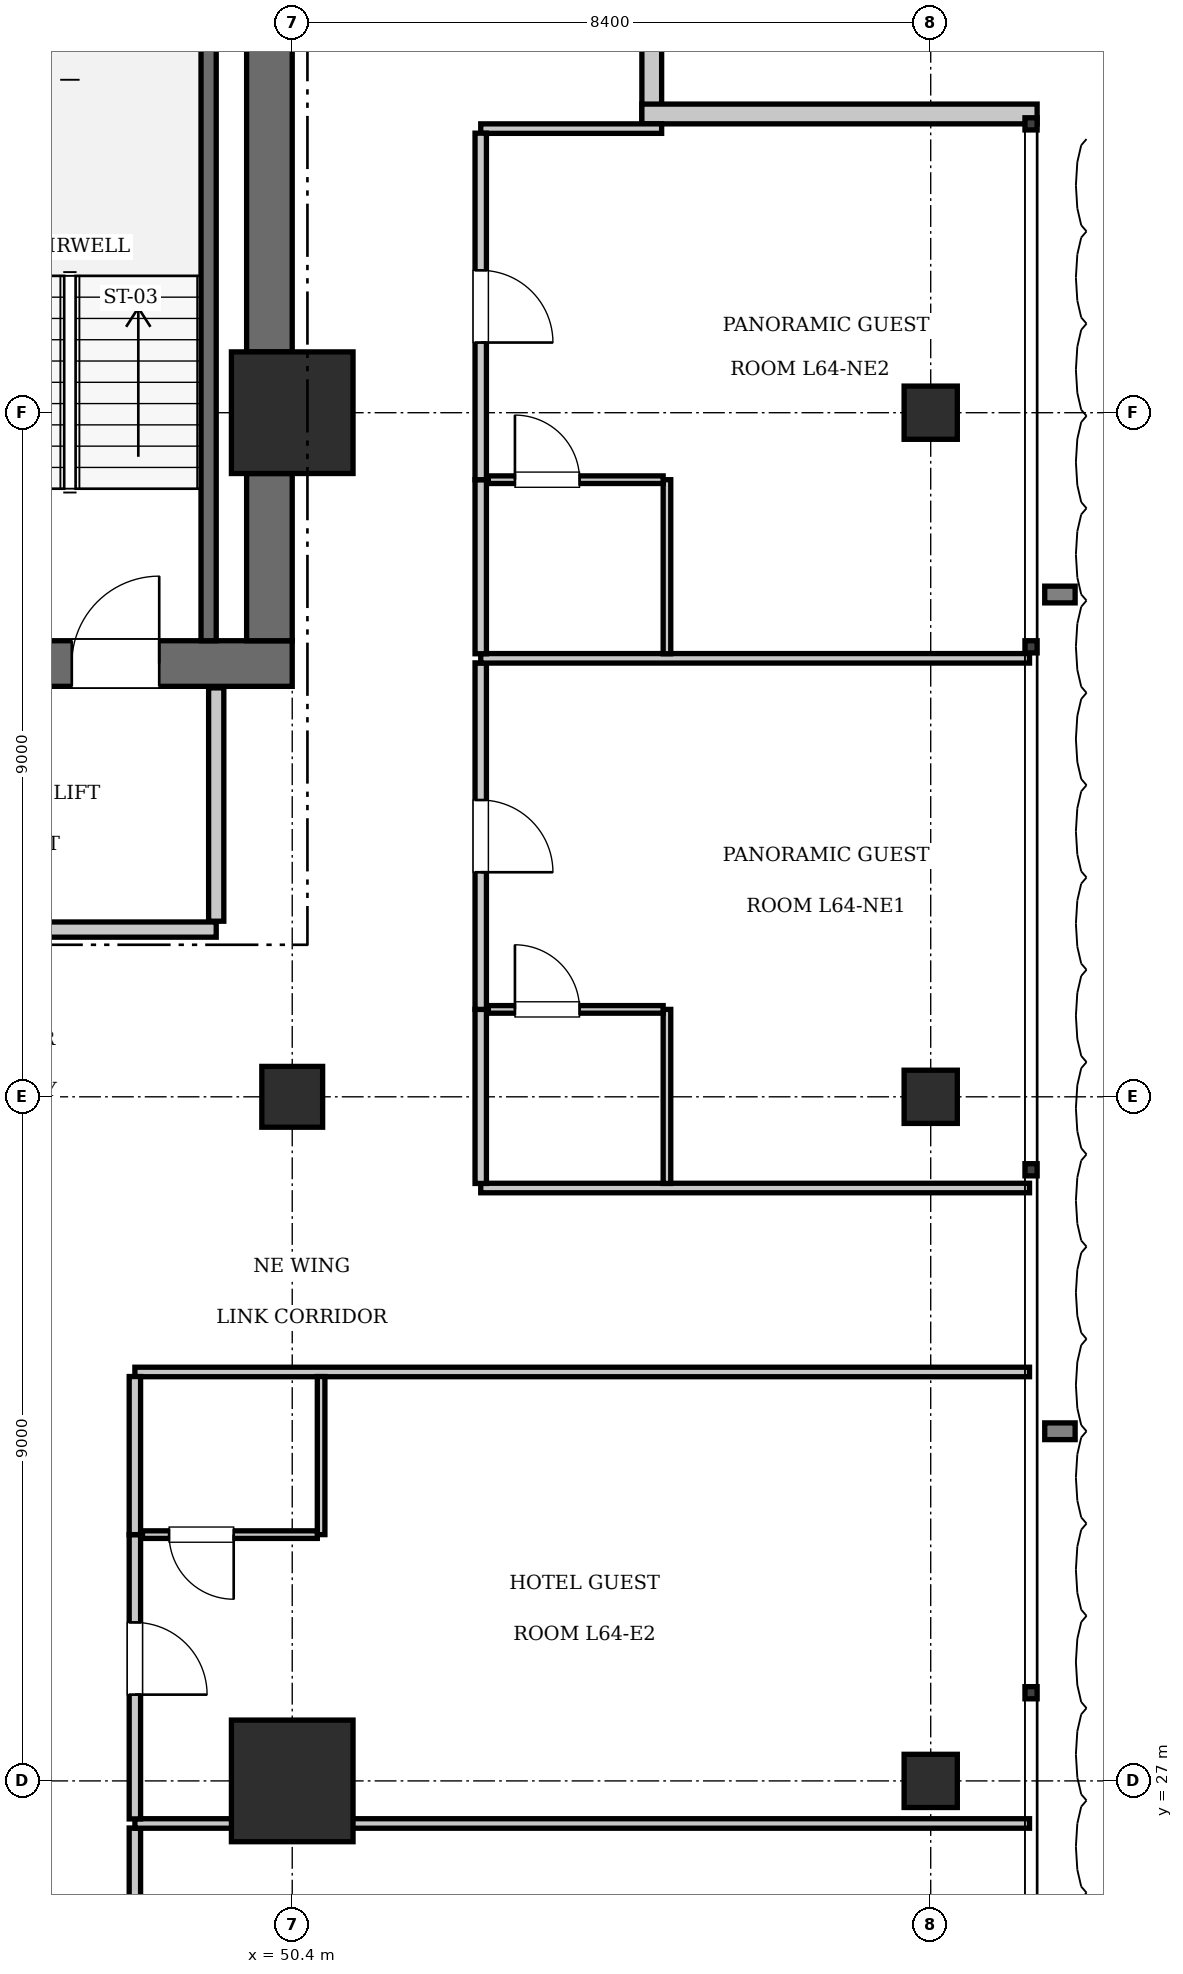
"""IFC4 building model, lengths in metres.
Left out: names, types, materials, properties, quantities, classifications, styles, units other than length and angle.
Written with IfcOpenShell. Run it as: python <this file> out.ifc"""

import sys

from ifc_helpers import new_model, si_unit, direction, frame, frame_2d, origin, origin_2d, place, context, subcontext, project, spatial, rectangle, extrude, element, fill, save


model = new_model("IFC4")
c1 = context("Model", 3, precision=1e-05, world=origin(), true_north=direction((0.0, 1.0)))
c2 = subcontext(c1, "Body", "Model", "MODEL_VIEW")
j1 = project(units=[si_unit("LENGTHUNIT", "METRE"), si_unit("PLANEANGLEUNIT", "RADIAN")], contexts=[c1])
p1 = place(None, origin())
s1 = spatial("IfcSite", under=j1, at=p1, CompositionType="ELEMENT")
p2 = place(p1, origin())
s2 = spatial("IfcBuilding", under=s1, at=p2, CompositionType="ELEMENT")
p3 = place(p2, frame((0.0, 0.0, 262.5)))
s3 = spatial("IfcBuildingStorey", under=s2, at=p3, CompositionType="ELEMENT", Elevation=262.5)
for number, where, z_axis, x_axis in (
    (1, (50.4, 27.0, 0.0), (0.0, 0.0, 1.0), (1.0, 0.0, 0.0)),
    (2, (50.4, 45.0, 0.0), (0.0, 0.0, 1.0), (1.0, 0.0, 0.0)),
):
    element("IfcColumn", number, at=place(p3, frame(where, z_axis=z_axis, x_axis=x_axis)), inside=s3, PredefinedType="COLUMN", context=c2, shape_type="SweptSolid", body=[
        extrude(rectangle(XDim=1.6, YDim=1.6, at=origin_2d()), origin(), (0.0, 0.0, 1.0), 3.85),
    ])
p4 = place(p3, frame((43.6, 41.7, 0.0), z_axis=(0.0, 0.0, 1.0), x_axis=(1.0, 0.0, 0.0)))
e3 = element("IfcWall", 3, at=p4, inside=s3, PredefinedType="SHEAR", context=c2, shape_type="SweptSolid", body=[
    extrude(rectangle(XDim=6.8, YDim=0.6, at=frame_2d((3.4, 0.0))), origin(), (0.0, 0.0, 1.0), 3.85),
])
p5 = place(p4, frame((3.9, 0.0, 0.0)))
e4 = element("IfcOpeningElement", 4, at=p5, cuts=e3, PredefinedType="OPENING", context=c2, shape_type="SweptSolid", body=[
    extrude(rectangle(XDim=1.15, YDim=2.15, at=frame_2d((0.575, 1.075))), frame((0.0, 0.31, 0.0), z_axis=(0.0, -1.0, 0.0), x_axis=(1.0, 0.0, 0.0)), (0.0, 0.0, 1.0), 0.62),
])
p6 = place(p4, frame((0.55, 0.0, 0.0)))
e5 = element("IfcOpeningElement", 5, at=p6, cuts=e3, PredefinedType="OPENING", context=c2, shape_type="SweptSolid", body=[
    extrude(rectangle(XDim=1.1, YDim=2.2, at=frame_2d((0.55, 1.1))), frame((0.0, 0.31, 0.0), z_axis=(0.0, -1.0, 0.0), x_axis=(1.0, 0.0, 0.0)), (0.0, 0.0, 1.0), 0.62),
])
p7 = place(p3, frame((50.1, 42.0, 0.0), z_axis=(0.0, 0.0, 1.0), x_axis=(0.0, 1.0, 0.0)))
e6 = element("IfcWall", 6, at=p7, inside=s3, PredefinedType="SHEAR", context=c2, shape_type="SweptSolid", body=[
    extrude(rectangle(XDim=2.2, YDim=0.6, at=frame_2d((1.1, 0.0))), origin(), (0.0, 0.0, 1.0), 3.85),
])
p8 = place(p3, frame((50.1, 45.8, 0.0), z_axis=(0.0, 0.0, 1.0), x_axis=(0.0, 1.0, 0.0)))
e7 = element("IfcWall", 7, at=p8, inside=s3, PredefinedType="SHEAR", context=c2, shape_type="SweptSolid", body=[
    extrude(rectangle(XDim=7.6, YDim=0.6, at=frame_2d((3.8, 0.0))), origin(), (0.0, 0.0, 1.0), 3.85),
])
p9 = place(p3, frame((50.4, 36.0, 0.0), z_axis=(0.0, 0.0, 1.0), x_axis=(1.0, 0.0, 0.0)))
e8 = element("IfcColumn", 8, at=p9, inside=s3, PredefinedType="COLUMN", context=c2, shape_type="SweptSolid", body=[
    extrude(rectangle(XDim=0.8, YDim=0.8, at=origin_2d()), origin(), (0.0, 0.0, 1.0), 3.85),
])
for number, where, z_axis, x_axis in (
    (9, (58.8, 27.0, 0.0), (0.0, 0.0, 1.0), (1.0, 0.0, 0.0)),
    (10, (58.8, 36.0, 0.0), (0.0, 0.0, 1.0), (1.0, 0.0, 0.0)),
    (11, (58.8, 45.0, 0.0), (0.0, 0.0, 1.0), (1.0, 0.0, 0.0)),
):
    element("IfcColumn", number, at=place(p3, frame(where, z_axis=z_axis, x_axis=x_axis)), inside=s3, PredefinedType="COLUMN", context=c2, shape_type="SweptSolid", body=[
        extrude(rectangle(XDim=0.7, YDim=0.7, at=origin_2d()), origin(), (0.0, 0.0, 1.0), 3.85),
    ])
p10 = place(p3, frame((49.3, 42.0, 0.0), z_axis=(0.0, 0.0, 1.0), x_axis=(0.0, 1.0, 0.0)))
e12 = element("IfcWall", 12, at=p10, inside=s3, PredefinedType="SOLIDWALL", context=c2, shape_type="SweptSolid", body=[
    extrude(rectangle(XDim=9.12, YDim=0.2, at=frame_2d((4.56, 0.0))), origin(), (0.0, 0.0, 1.0), 3.61),
])
for number, where, z_axis, x_axis in (
    (13, (55.13, 54.0, 0.0), (0.0, 0.0, 1.0), (0.0, -1.0, 0.0)),
    (14, (55.0, 48.93, 0.0), (0.0, 0.0, 1.0), (1.0, 0.0, 0.0)),
):
    element("IfcWall", number, at=place(p3, frame(where, z_axis=z_axis, x_axis=x_axis)), inside=s3, PredefinedType="SOLIDWALL", context=c2, shape_type="SweptSolid", body=[
        extrude(rectangle(XDim=5.2, YDim=0.26, at=frame_2d((2.6, 0.0))), origin(), (0.0, 0.0, 1.0), 3.61),
    ])
p11 = place(p3, frame((43.6, 38.2, 0.0), z_axis=(0.0, 0.0, 1.0), x_axis=(1.0, 0.0, 0.0)))
e15 = element("IfcWall", 15, at=p11, inside=s3, PredefinedType="PARTITIONING", context=c2, shape_type="SweptSolid", body=[
    extrude(rectangle(XDim=5.8, YDim=0.2, at=frame_2d((2.9, 0.0))), origin(), (0.0, 0.0, 1.0), 3.61),
])
p12 = place(p11, frame((2.3, 0.0, 0.0)))
e16 = element("IfcOpeningElement", 16, at=p12, cuts=e15, PredefinedType="OPENING", context=c2, shape_type="SweptSolid", body=[
    extrude(rectangle(XDim=1.15, YDim=2.15, at=frame_2d((0.575, 1.075))), frame((0.0, 0.11, 0.0), z_axis=(0.0, -1.0, 0.0), x_axis=(1.0, 0.0, 0.0)), (0.0, 0.0, 1.0), 0.22),
])
p13 = place(p3, frame((49.4, 38.31, 0.0), z_axis=(0.0, 0.0, 1.0), x_axis=(0.0, 1.0, 0.0)))
e17 = element("IfcWall", 17, at=p13, inside=s3, PredefinedType="PARTITIONING", context=c2, shape_type="SweptSolid", body=[
    extrude(rectangle(XDim=3.07, YDim=0.2, at=frame_2d((1.535, 0.0))), origin(), (0.0, 0.0, 1.0), 3.61),
])
p14 = place(p3, frame((48.33, 32.38, 0.0), z_axis=(0.0, 0.0, 1.0), x_axis=(1.0, 0.0, 0.0)))
e18 = element("IfcWall", 18, at=p14, inside=s3, PredefinedType="PARTITIONING", context=c2, shape_type="SweptSolid", body=[
    extrude(rectangle(XDim=11.77, YDim=0.125, at=frame_2d((5.885, 0.0))), origin(), (0.0, 0.0, 1.0), 3.61),
])
p15 = place(p3, frame((48.33, 22.64, 0.0), z_axis=(0.0, 0.0, 1.0), x_axis=(0.0, 1.0, 0.0)))
e19 = element("IfcWall", 19, at=p15, inside=s3, PredefinedType="PARTITIONING", context=c2, shape_type="SweptSolid", body=[
    extrude(rectangle(XDim=3.74, YDim=0.15, at=frame_2d((1.87, 0.0))), origin(), (0.0, 0.0, 1.0), 3.61),
])
p16 = place(p15, frame((1.395, 0.0, 0.0)))
e20 = element("IfcOpeningElement", 20, at=p16, cuts=e19, PredefinedType="OPENING", context=c2, shape_type="SweptSolid", body=[
    extrude(rectangle(XDim=0.95, YDim=2.15, at=frame_2d((0.475, 1.075))), frame((0.0, 0.085, 0.0), z_axis=(0.0, -1.0, 0.0), x_axis=(1.0, 0.0, 0.0)), (0.0, 0.0, 1.0), 0.17),
])
p17 = place(p3, frame((48.33, 26.44, 0.0), z_axis=(0.0, 0.0, 1.0), x_axis=(1.0, 0.0, 0.0)))
e21 = element("IfcWall", 21, at=p17, inside=s3, PredefinedType="PARTITIONING", context=c2, shape_type="SweptSolid", body=[
    extrude(rectangle(XDim=11.77, YDim=0.125, at=frame_2d((5.885, 0.0))), origin(), (0.0, 0.0, 1.0), 3.61),
])
p18 = place(p3, frame((48.33, 26.5, 0.0), z_axis=(0.0, 0.0, 1.0), x_axis=(0.0, 1.0, 0.0)))
e22 = element("IfcWall", 22, at=p18, inside=s3, PredefinedType="PARTITIONING", context=c2, shape_type="SweptSolid", body=[
    extrude(rectangle(XDim=3.74, YDim=0.15, at=frame_2d((1.87, 0.0))), origin(), (0.0, 0.0, 1.0), 3.61),
])
p19 = place(p18, frame((1.635, 0.0, 0.0)))
e23 = element("IfcOpeningElement", 23, at=p19, cuts=e22, PredefinedType="OPENING", context=c2, shape_type="SweptSolid", body=[
    extrude(rectangle(XDim=0.95, YDim=2.15, at=frame_2d((0.475, 1.075))), frame((0.0, 0.085, 0.0), z_axis=(0.0, -1.0, 0.0), x_axis=(1.0, 0.0, 0.0)), (0.0, 0.0, 1.0), 0.17),
])
p20 = place(p3, frame((48.33, 30.24, 0.0), z_axis=(0.0, 0.0, 1.0), x_axis=(0.0, 1.0, 0.0)))
e24 = element("IfcWall", 24, at=p20, inside=s3, PredefinedType="PARTITIONING", context=c2, shape_type="SweptSolid", body=[
    extrude(rectangle(XDim=2.08, YDim=0.15, at=frame_2d((1.04, 0.0))), origin(), (0.0, 0.0, 1.0), 3.61),
])
p21 = place(p3, frame((50.78, 30.24, 0.0), z_axis=(0.0, 0.0, 1.0), x_axis=(0.0, 1.0, 0.0)))
e25 = element("IfcWall", 25, at=p21, inside=s3, PredefinedType="PARTITIONING", context=c2, shape_type="SweptSolid", body=[
    extrude(rectangle(XDim=2.08, YDim=0.1, at=frame_2d((1.04, 0.0))), origin(), (0.0, 0.0, 1.0), 3.61),
])
p22 = place(p3, frame((48.43, 30.24, 0.0), z_axis=(0.0, 0.0, 1.0), x_axis=(1.0, 0.0, 0.0)))
e26 = element("IfcWall", 26, at=p22, inside=s3, PredefinedType="PARTITIONING", context=c2, shape_type="SweptSolid", body=[
    extrude(rectangle(XDim=2.3, YDim=0.1, at=frame_2d((1.15, 0.0))), origin(), (0.0, 0.0, 1.0), 3.61),
])
p23 = place(p22, frame((0.35, 0.0, 0.0)))
e27 = element("IfcOpeningElement", 27, at=p23, cuts=e26, PredefinedType="OPENING", context=c2, shape_type="SweptSolid", body=[
    extrude(rectangle(XDim=0.85, YDim=2.1, at=frame_2d((0.425, 1.05))), frame((0.0, 0.06, 0.0), z_axis=(0.0, -1.0, 0.0), x_axis=(1.0, 0.0, 0.0)), (0.0, 0.0, 1.0), 0.12),
])
p24 = place(p3, frame((52.88, 34.8, 0.0), z_axis=(0.0, 0.0, 1.0), x_axis=(1.0, 0.0, 0.0)))
e28 = element("IfcWall", 28, at=p24, inside=s3, PredefinedType="PARTITIONING", context=c2, shape_type="SweptSolid", body=[
    extrude(rectangle(XDim=7.22, YDim=0.125, at=frame_2d((3.61, 0.0))), origin(), (0.0, 0.0, 1.0), 3.61),
])
p25 = place(p3, frame((52.88, 48.738, 0.0), z_axis=(0.0, 0.0, 1.0), x_axis=(1.0, 0.0, 0.0)))
e29 = element("IfcWall", 29, at=p25, inside=s3, PredefinedType="PARTITIONING", context=c2, shape_type="SweptSolid", body=[
    extrude(rectangle(XDim=2.38, YDim=0.125, at=frame_2d((1.19, 0.0))), origin(), (0.0, 0.0, 1.0), 3.61),
])
p26 = place(p3, frame((52.88, 34.86, 0.0), z_axis=(0.0, 0.0, 1.0), x_axis=(0.0, 1.0, 0.0)))
e30 = element("IfcWall", 30, at=p26, inside=s3, PredefinedType="PARTITIONING", context=c2, shape_type="SweptSolid", body=[
    extrude(rectangle(XDim=2.29, YDim=0.15, at=frame_2d((1.145, 0.0))), origin(), (0.0, 0.0, 1.0), 3.61),
])
p27 = place(p3, frame((52.88, 37.15, 0.0), z_axis=(0.0, 0.0, 1.0), x_axis=(0.0, 1.0, 0.0)))
e31 = element("IfcWall", 31, at=p27, inside=s3, PredefinedType="PARTITIONING", context=c2, shape_type="SweptSolid", body=[
    extrude(rectangle(XDim=4.559, YDim=0.15, at=frame_2d((2.279, 0.0))), origin(), (0.0, 0.0, 1.0), 3.61),
])
p28 = place(p27, frame((1.804, 0.0, 0.0)))
e32 = element("IfcOpeningElement", 32, at=p28, cuts=e31, PredefinedType="OPENING", context=c2, shape_type="SweptSolid", body=[
    extrude(rectangle(XDim=0.95, YDim=2.15, at=frame_2d((0.475, 1.075))), frame((0.0, 0.085, 0.0), z_axis=(0.0, -1.0, 0.0), x_axis=(1.0, 0.0, 0.0)), (0.0, 0.0, 1.0), 0.17),
])
p29 = place(p3, frame((55.33, 34.86, 0.0), z_axis=(0.0, 0.0, 1.0), x_axis=(0.0, 1.0, 0.0)))
e33 = element("IfcWall", 33, at=p29, inside=s3, PredefinedType="PARTITIONING", context=c2, shape_type="SweptSolid", body=[
    extrude(rectangle(XDim=2.29, YDim=0.1, at=frame_2d((1.145, 0.0))), origin(), (0.0, 0.0, 1.0), 3.61),
])
p30 = place(p3, frame((52.98, 37.15, 0.0), z_axis=(0.0, 0.0, 1.0), x_axis=(1.0, 0.0, 0.0)))
e34 = element("IfcWall", 34, at=p30, inside=s3, PredefinedType="PARTITIONING", context=c2, shape_type="SweptSolid", body=[
    extrude(rectangle(XDim=2.3, YDim=0.1, at=frame_2d((1.15, 0.0))), origin(), (0.0, 0.0, 1.0), 3.61),
])
p31 = place(p30, frame((0.35, 0.0, 0.0)))
e35 = element("IfcOpeningElement", 35, at=p31, cuts=e34, PredefinedType="OPENING", context=c2, shape_type="SweptSolid", body=[
    extrude(rectangle(XDim=0.85, YDim=2.1, at=frame_2d((0.425, 1.05))), frame((0.0, 0.06, 0.0), z_axis=(0.0, -1.0, 0.0), x_axis=(1.0, 0.0, 0.0)), (0.0, 0.0, 1.0), 0.12),
])
p32 = place(p3, frame((52.88, 41.769, 0.0), z_axis=(0.0, 0.0, 1.0), x_axis=(1.0, 0.0, 0.0)))
e36 = element("IfcWall", 36, at=p32, inside=s3, PredefinedType="PARTITIONING", context=c2, shape_type="SweptSolid", body=[
    extrude(rectangle(XDim=7.22, YDim=0.125, at=frame_2d((3.61, 0.0))), origin(), (0.0, 0.0, 1.0), 3.61),
])
p33 = place(p3, frame((52.88, 41.829, 0.0), z_axis=(0.0, 0.0, 1.0), x_axis=(0.0, 1.0, 0.0)))
e37 = element("IfcWall", 37, at=p33, inside=s3, PredefinedType="PARTITIONING", context=c2, shape_type="SweptSolid", body=[
    extrude(rectangle(XDim=2.29, YDim=0.15, at=frame_2d((1.145, 0.0))), origin(), (0.0, 0.0, 1.0), 3.61),
])
p34 = place(p3, frame((52.88, 44.119, 0.0), z_axis=(0.0, 0.0, 1.0), x_axis=(0.0, 1.0, 0.0)))
e38 = element("IfcWall", 38, at=p34, inside=s3, PredefinedType="PARTITIONING", context=c2, shape_type="SweptSolid", body=[
    extrude(rectangle(XDim=4.559, YDim=0.15, at=frame_2d((2.279, 0.0))), origin(), (0.0, 0.0, 1.0), 3.61),
])
p35 = place(p34, frame((1.804, 0.0, 0.0)))
e39 = element("IfcOpeningElement", 39, at=p35, cuts=e38, PredefinedType="OPENING", context=c2, shape_type="SweptSolid", body=[
    extrude(rectangle(XDim=0.95, YDim=2.15, at=frame_2d((0.475, 1.075))), frame((0.0, 0.085, 0.0), z_axis=(0.0, -1.0, 0.0), x_axis=(1.0, 0.0, 0.0)), (0.0, 0.0, 1.0), 0.17),
])
p36 = place(p3, frame((55.33, 41.829, 0.0), z_axis=(0.0, 0.0, 1.0), x_axis=(0.0, 1.0, 0.0)))
e40 = element("IfcWall", 40, at=p36, inside=s3, PredefinedType="PARTITIONING", context=c2, shape_type="SweptSolid", body=[
    extrude(rectangle(XDim=2.29, YDim=0.1, at=frame_2d((1.145, 0.0))), origin(), (0.0, 0.0, 1.0), 3.61),
])
p37 = place(p3, frame((52.98, 44.119, 0.0), z_axis=(0.0, 0.0, 1.0), x_axis=(1.0, 0.0, 0.0)))
e41 = element("IfcWall", 41, at=p37, inside=s3, PredefinedType="PARTITIONING", context=c2, shape_type="SweptSolid", body=[
    extrude(rectangle(XDim=2.3, YDim=0.1, at=frame_2d((1.15, 0.0))), origin(), (0.0, 0.0, 1.0), 3.61),
])
p38 = place(p37, frame((0.35, 0.0, 0.0)))
e42 = element("IfcOpeningElement", 42, at=p38, cuts=e41, PredefinedType="OPENING", context=c2, shape_type="SweptSolid", body=[
    extrude(rectangle(XDim=0.85, YDim=2.1, at=frame_2d((0.425, 1.05))), frame((0.0, 0.06, 0.0), z_axis=(0.0, -1.0, 0.0), x_axis=(1.0, 0.0, 0.0)), (0.0, 0.0, 1.0), 0.12),
])
p39 = place(p5, origin())
e43 = element("IfcDoor", 43, at=p39, inside=s3, OperationType="SINGLE_SWING_RIGHT", PredefinedType="DOOR", context=c2, shape_type="SweptSolid", body=[
    extrude(rectangle(XDim=1.15, YDim=2.15, at=frame_2d((0.575, 1.075))), frame((0.0, 0.025, 0.0), z_axis=(0.0, -1.0, 0.0), x_axis=(1.0, 0.0, 0.0)), (0.0, 0.0, 1.0), 0.05),
])
fill(e4, e43)
p40 = place(p23, frame((0.85, 0.0, 0.0), z_axis=(0.0, 0.0, 1.0), x_axis=(-1.0, 0.0, 0.0)))
e44 = element("IfcDoor", 44, at=p40, inside=s3, OperationType="SINGLE_SWING_LEFT", PredefinedType="DOOR", context=c2, shape_type="SweptSolid", body=[
    extrude(rectangle(XDim=0.85, YDim=2.1, at=frame_2d((0.425, 1.05))), frame((0.0, 0.025, 0.0), z_axis=(0.0, -1.0, 0.0), x_axis=(1.0, 0.0, 0.0)), (0.0, 0.0, 1.0), 0.05),
])
fill(e27, e44)
p41 = place(p19, frame((0.95, 0.0, 0.0), z_axis=(0.0, 0.0, 1.0), x_axis=(-1.0, 0.0, 0.0)))
e45 = element("IfcDoor", 45, at=p41, inside=s3, OperationType="SINGLE_SWING_RIGHT", PredefinedType="DOOR", context=c2, shape_type="SweptSolid", body=[
    extrude(rectangle(XDim=0.95, YDim=2.15, at=frame_2d((0.475, 1.075))), frame((0.0, 0.025, 0.0), z_axis=(0.0, -1.0, 0.0), x_axis=(1.0, 0.0, 0.0)), (0.0, 0.0, 1.0), 0.05),
])
fill(e23, e45)
p42 = place(p31, origin())
e46 = element("IfcDoor", 46, at=p42, inside=s3, OperationType="SINGLE_SWING_LEFT", PredefinedType="DOOR", context=c2, shape_type="SweptSolid", body=[
    extrude(rectangle(XDim=0.85, YDim=2.1, at=frame_2d((0.425, 1.05))), frame((0.0, 0.025, 0.0), z_axis=(0.0, -1.0, 0.0), x_axis=(1.0, 0.0, 0.0)), (0.0, 0.0, 1.0), 0.05),
])
fill(e35, e46)
p43 = place(p28, frame((0.95, 0.0, 0.0), z_axis=(0.0, 0.0, 1.0), x_axis=(-1.0, 0.0, 0.0)))
e47 = element("IfcDoor", 47, at=p43, inside=s3, OperationType="SINGLE_SWING_RIGHT", PredefinedType="DOOR", context=c2, shape_type="SweptSolid", body=[
    extrude(rectangle(XDim=0.95, YDim=2.15, at=frame_2d((0.475, 1.075))), frame((0.0, 0.025, 0.0), z_axis=(0.0, -1.0, 0.0), x_axis=(1.0, 0.0, 0.0)), (0.0, 0.0, 1.0), 0.05),
])
fill(e32, e47)
p44 = place(p38, origin())
e48 = element("IfcDoor", 48, at=p44, inside=s3, OperationType="SINGLE_SWING_LEFT", PredefinedType="DOOR", context=c2, shape_type="SweptSolid", body=[
    extrude(rectangle(XDim=0.85, YDim=2.1, at=frame_2d((0.425, 1.05))), frame((0.0, 0.025, 0.0), z_axis=(0.0, -1.0, 0.0), x_axis=(1.0, 0.0, 0.0)), (0.0, 0.0, 1.0), 0.05),
])
fill(e42, e48)
p45 = place(p35, frame((0.95, 0.0, 0.0), z_axis=(0.0, 0.0, 1.0), x_axis=(-1.0, 0.0, 0.0)))
e49 = element("IfcDoor", 49, at=p45, inside=s3, OperationType="SINGLE_SWING_RIGHT", PredefinedType="DOOR", context=c2, shape_type="SweptSolid", body=[
    extrude(rectangle(XDim=0.95, YDim=2.15, at=frame_2d((0.475, 1.075))), frame((0.0, 0.025, 0.0), z_axis=(0.0, -1.0, 0.0), x_axis=(1.0, 0.0, 0.0)), (0.0, 0.0, 1.0), 0.05),
])
fill(e39, e49)
save(model, sys.argv[1])
